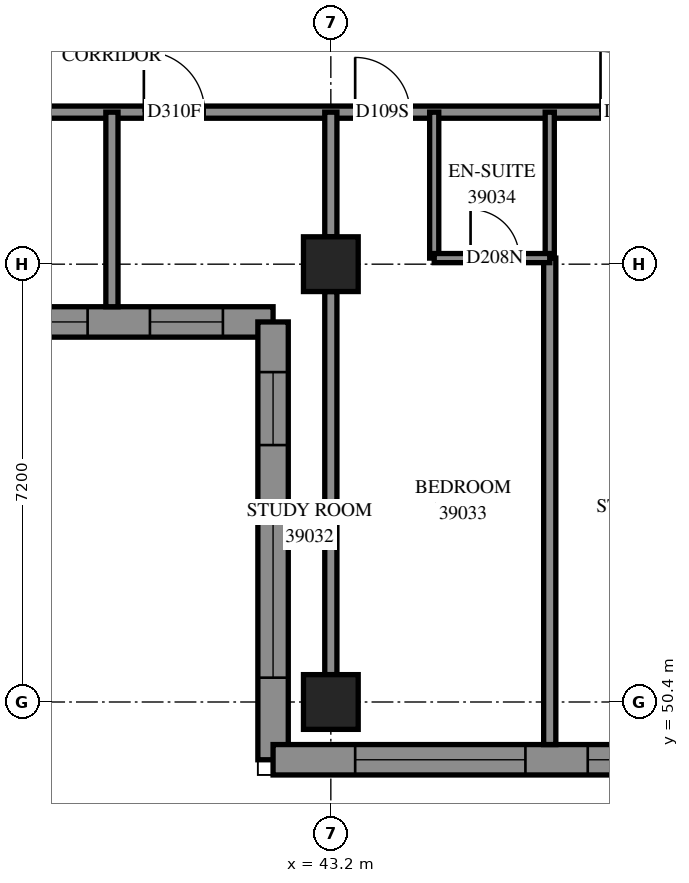
"""IFC4 building model, lengths in metres.
Left out: names, types, materials, properties, quantities, classifications, styles, units other than length and angle.
Written with IfcOpenShell. Run it as: python <this file> out.ifc"""

import sys

from ifc_helpers import new_model, si_unit, direction, frame, frame_2d, origin, origin_2d, place, context, subcontext, project, spatial, polyline, rectangle, outline, extrude, element, fill, save


model = new_model("IFC4")
c1 = context("Model", 3, precision=1e-05, world=origin(), true_north=direction((0.0, 1.0)))
c2 = subcontext(c1, "Body", "Model", "MODEL_VIEW")
j1 = project(units=[si_unit("LENGTHUNIT", "METRE"), si_unit("PLANEANGLEUNIT", "RADIAN")], contexts=[c1])
p1 = place(None, origin())
s1 = spatial("IfcSite", under=j1, at=p1, CompositionType="ELEMENT")
p2 = place(p1, origin())
s2 = spatial("IfcBuilding", under=s1, at=p2, CompositionType="ELEMENT")
p3 = place(p2, frame((0.0, 0.0, 145.6)))
s3 = spatial("IfcBuildingStorey", under=s2, at=p3, CompositionType="ELEMENT", Elevation=145.6)
for number, where, z_axis, x_axis in (
    (1, (43.2, 50.4, 0.0), (0.0, 0.0, 1.0), (1.0, 0.0, 0.0)),
    (2, (43.2, 57.6, 0.0), (0.0, 0.0, 1.0), (1.0, 0.0, 0.0)),
):
    element("IfcColumn", number, at=place(p3, frame(where, z_axis=z_axis, x_axis=x_axis)), inside=s3, PredefinedType="COLUMN", context=c2, shape_type="SweptSolid", body=[
        extrude(rectangle(XDim=0.9, YDim=0.9, at=origin_2d()), origin(), (0.0, 0.0, 1.0), 3.1),
    ])
p4 = place(p3, frame((35.05, 56.65, 0.0), z_axis=(0.0, 0.0, 1.0), x_axis=(1.0, 0.0, 0.0)))
e3 = element("IfcWall", 3, at=p4, inside=s3, PredefinedType="SOLIDWALL", context=c2, shape_type="SweptSolid", body=[
    extrude(outline(polyline([(-0.25, -0.25), (6.95, -0.25), (7.45, 0.25), (0.25, 0.25), (-0.25, -0.25)])), origin(), (0.0, 0.0, 1.0), 3.1),
])
p5 = place(p4, frame((1.35, 0.0, 0.45)))
e4 = element("IfcOpeningElement", 4, at=p5, cuts=e3, PredefinedType="OPENING", context=c2, shape_type="SweptSolid", body=[
    extrude(rectangle(XDim=2.8, YDim=2.5, at=frame_2d((1.4, 1.25))), frame((0.0, 0.26, 0.0), z_axis=(0.0, -1.0, 0.0), x_axis=(1.0, 0.0, 0.0)), (0.0, 0.0, 1.0), 0.52),
])
p6 = place(p4, frame((5.175, 0.0, 0.45)))
e5 = element("IfcOpeningElement", 5, at=p6, cuts=e3, PredefinedType="OPENING", context=c2, shape_type="SweptSolid", body=[
    extrude(rectangle(XDim=1.2, YDim=2.5, at=frame_2d((0.6, 1.25))), frame((0.0, 0.26, 0.0), z_axis=(0.0, -1.0, 0.0), x_axis=(1.0, 0.0, 0.0)), (0.0, 0.0, 1.0), 0.52),
])
p7 = place(p3, frame((42.25, 56.65, 0.0), z_axis=(0.0, 0.0, 1.0), x_axis=(0.0, -1.0, 0.0)))
e6 = element("IfcWall", 6, at=p7, inside=s3, PredefinedType="SOLIDWALL", context=c2, shape_type="SweptSolid", body=[
    extrude(outline(polyline([(0.25, -0.25), (7.45, -0.25), (6.95, 0.25), (-0.25, 0.25), (0.25, -0.25)])), origin(), (0.0, 0.0, 1.0), 3.1),
])
p8 = place(p7, frame((3.05, 0.0, 0.45)))
e7 = element("IfcOpeningElement", 7, at=p8, cuts=e6, PredefinedType="OPENING", context=c2, shape_type="SweptSolid", body=[
    extrude(rectangle(XDim=2.8, YDim=2.5, at=frame_2d((1.4, 1.25))), frame((0.0, 0.26, 0.0), z_axis=(0.0, -1.0, 0.0), x_axis=(1.0, 0.0, 0.0)), (0.0, 0.0, 1.0), 0.52),
])
p9 = place(p7, frame((0.825, 0.0, 0.45)))
e8 = element("IfcOpeningElement", 8, at=p9, cuts=e6, PredefinedType="OPENING", context=c2, shape_type="SweptSolid", body=[
    extrude(rectangle(XDim=1.2, YDim=2.5, at=frame_2d((0.6, 1.25))), frame((0.0, 0.26, 0.0), z_axis=(0.0, -1.0, 0.0), x_axis=(1.0, 0.0, 0.0)), (0.0, 0.0, 1.0), 0.52),
])
p10 = place(p3, frame((42.25, 49.45, 0.0), z_axis=(0.0, 0.0, 1.0), x_axis=(1.0, 0.0, 0.0)))
e9 = element("IfcWall", 9, at=p10, inside=s3, PredefinedType="SOLIDWALL", context=c2, shape_type="SweptSolid", body=[
    extrude(outline(polyline([(-0.25, -0.25), (6.95, -0.25), (7.45, 0.25), (0.25, 0.25), (-0.25, -0.25)])), origin(), (0.0, 0.0, 1.0), 3.1),
])
p11 = place(p10, frame((1.35, 0.0, 0.45)))
e10 = element("IfcOpeningElement", 10, at=p11, cuts=e9, PredefinedType="OPENING", context=c2, shape_type="SweptSolid", body=[
    extrude(rectangle(XDim=2.8, YDim=2.5, at=frame_2d((1.4, 1.25))), frame((0.0, 0.26, 0.0), z_axis=(0.0, -1.0, 0.0), x_axis=(1.0, 0.0, 0.0)), (0.0, 0.0, 1.0), 0.52),
])
p12 = place(p10, frame((5.175, 0.0, 0.45)))
e11 = element("IfcOpeningElement", 11, at=p12, cuts=e9, PredefinedType="OPENING", context=c2, shape_type="SweptSolid", body=[
    extrude(rectangle(XDim=1.2, YDim=2.5, at=frame_2d((0.6, 1.25))), frame((0.0, 0.26, 0.0), z_axis=(0.0, -1.0, 0.0), x_axis=(1.0, 0.0, 0.0)), (0.0, 0.0, 1.0), 0.52),
])
p13 = place(p3, frame((36.0, 60.1, 0.0), z_axis=(0.0, 0.0, 1.0), x_axis=(1.0, 0.0, 0.0)))
e12 = element("IfcWall", 12, at=p13, inside=s3, PredefinedType="PARTITIONING", context=c2, shape_type="SweptSolid", body=[
    extrude(rectangle(XDim=16.9, YDim=0.2, at=frame_2d((8.45, 0.0))), origin(), (0.0, 0.0, 1.0), 3.1),
])
p14 = place(p13, frame((4.125, 0.0, 0.0)))
e13 = element("IfcOpeningElement", 13, at=p14, cuts=e12, PredefinedType="OPENING", context=c2, shape_type="SweptSolid", body=[
    extrude(rectangle(XDim=1.0, YDim=2.1, at=frame_2d((0.5, 1.05))), frame((0.0, 0.11, 0.0), z_axis=(0.0, -1.0, 0.0), x_axis=(1.0, 0.0, 0.0)), (0.0, 0.0, 1.0), 0.22),
])
p15 = place(p13, frame((7.6, 0.0, 0.0)))
e14 = element("IfcOpeningElement", 14, at=p15, cuts=e12, PredefinedType="OPENING", context=c2, shape_type="SweptSolid", body=[
    extrude(rectangle(XDim=0.9, YDim=2.1, at=frame_2d((0.45, 1.05))), frame((0.0, 0.11, 0.0), z_axis=(0.0, -1.0, 0.0), x_axis=(1.0, 0.0, 0.0)), (0.0, 0.0, 1.0), 0.22),
])
p16 = place(p13, frame((11.635, 0.0, 0.0)))
e15 = element("IfcOpeningElement", 15, at=p16, cuts=e12, PredefinedType="OPENING", context=c2, shape_type="SweptSolid", body=[
    extrude(rectangle(XDim=1.0, YDim=2.1, at=frame_2d((0.5, 1.05))), frame((0.0, 0.11, 0.0), z_axis=(0.0, -1.0, 0.0), x_axis=(1.0, 0.0, 0.0)), (0.0, 0.0, 1.0), 0.22),
])
p17 = place(p13, frame((15.652, 0.0, 0.0)))
e16 = element("IfcOpeningElement", 16, at=p17, cuts=e12, PredefinedType="OPENING", context=c2, shape_type="SweptSolid", body=[
    extrude(rectangle(XDim=1.0, YDim=2.1, at=frame_2d((0.5, 1.05))), frame((0.0, 0.11, 0.0), z_axis=(0.0, -1.0, 0.0), x_axis=(1.0, 0.0, 0.0)), (0.0, 0.0, 1.0), 0.22),
])
p18 = place(p3, frame((46.8, 49.7, 0.0), z_axis=(0.0, 0.0, 1.0), x_axis=(0.0, 1.0, 0.0)))
e17 = element("IfcWall", 17, at=p18, inside=s3, PredefinedType="PARTITIONING", context=c2, shape_type="SweptSolid", body=[
    extrude(rectangle(XDim=8.0, YDim=0.2, at=frame_2d((4.0, 0.0))), origin(), (0.0, 0.0, 1.0), 3.1),
])
p19 = place(p3, frame((43.2, 50.85, 0.0), z_axis=(0.0, 0.0, 1.0), x_axis=(0.0, 1.0, 0.0)))
e18 = element("IfcWall", 18, at=p19, inside=s3, PredefinedType="PARTITIONING", context=c2, shape_type="SweptSolid", body=[
    extrude(rectangle(XDim=6.3, YDim=0.2, at=frame_2d((3.15, 0.0))), origin(), (0.0, 0.0, 1.0), 2.6),
])
p20 = place(p3, frame((39.6, 56.9, 0.0), z_axis=(0.0, 0.0, 1.0), x_axis=(0.0, 1.0, 0.0)))
e19 = element("IfcWall", 19, at=p20, inside=s3, PredefinedType="PARTITIONING", context=c2, shape_type="SweptSolid", body=[
    extrude(rectangle(XDim=3.2, YDim=0.2, at=frame_2d((1.6, 0.0))), origin(), (0.0, 0.0, 1.0), 3.1),
])
for number, where, z_axis, x_axis in (
    (20, (44.9, 57.7, 0.0), (0.0, 0.0, 1.0), (0.0, 1.0, 0.0)),
    (21, (46.8, 57.7, 0.0), (0.0, 0.0, 1.0), (0.0, 1.0, 0.0)),
):
    element("IfcWall", number, at=place(p3, frame(where, z_axis=z_axis, x_axis=x_axis)), inside=s3, PredefinedType="PARTITIONING", context=c2, shape_type="SweptSolid", body=[
        extrude(rectangle(XDim=2.4, YDim=0.15, at=frame_2d((1.2, 0.0))), origin(), (0.0, 0.0, 1.0), 3.1),
    ])
p21 = place(p3, frame((43.2, 58.05, 0.0), z_axis=(0.0, 0.0, 1.0), x_axis=(0.0, 1.0, 0.0)))
e22 = element("IfcWall", 22, at=p21, inside=s3, PredefinedType="PARTITIONING", context=c2, shape_type="SweptSolid", body=[
    extrude(rectangle(XDim=2.05, YDim=0.2, at=frame_2d((1.025, 0.0))), origin(), (0.0, 0.0, 1.0), 3.1),
])
p22 = place(p3, frame((44.9, 57.7, 0.0), z_axis=(0.0, 0.0, 1.0), x_axis=(1.0, 0.0, 0.0)))
e23 = element("IfcWall", 23, at=p22, inside=s3, PredefinedType="PARTITIONING", context=c2, shape_type="SweptSolid", body=[
    extrude(rectangle(XDim=1.9, YDim=0.15, at=frame_2d((0.95, 0.0))), origin(), (0.0, 0.0, 1.0), 3.1),
])
p23 = place(p22, frame((0.598, 0.0, 0.0)))
e24 = element("IfcOpeningElement", 24, at=p23, cuts=e23, PredefinedType="OPENING", context=c2, shape_type="SweptSolid", body=[
    extrude(rectangle(XDim=0.8, YDim=2.1, at=frame_2d((0.4, 1.05))), frame((0.0, 0.085, 0.0), z_axis=(0.0, -1.0, 0.0), x_axis=(1.0, 0.0, 0.0)), (0.0, 0.0, 1.0), 0.17),
])
p24 = place(p5, origin())
e25 = element("IfcWindow", 25, at=p24, inside=s3, PartitioningType="SINGLE_PANEL", PredefinedType="WINDOW", context=c2, shape_type="SweptSolid", body=[
    extrude(rectangle(XDim=2.8, YDim=2.5, at=frame_2d((1.4, 1.25))), frame((0.0, 0.18, 0.0), z_axis=(0.0, -1.0, 0.0), x_axis=(1.0, 0.0, 0.0)), (0.0, 0.0, 1.0), 0.06),
])
fill(e4, e25)
p25 = place(p6, origin())
e26 = element("IfcWindow", 26, at=p25, inside=s3, PartitioningType="SINGLE_PANEL", PredefinedType="WINDOW", context=c2, shape_type="SweptSolid", body=[
    extrude(rectangle(XDim=1.2, YDim=2.5, at=frame_2d((0.6, 1.25))), frame((0.0, 0.18, 0.0), z_axis=(0.0, -1.0, 0.0), x_axis=(1.0, 0.0, 0.0)), (0.0, 0.0, 1.0), 0.06),
])
fill(e5, e26)
p26 = place(p8, origin())
e27 = element("IfcWindow", 27, at=p26, inside=s3, PartitioningType="SINGLE_PANEL", PredefinedType="WINDOW", context=c2, shape_type="SweptSolid", body=[
    extrude(rectangle(XDim=2.8, YDim=2.5, at=frame_2d((1.4, 1.25))), frame((0.0, 0.18, 0.0), z_axis=(0.0, -1.0, 0.0), x_axis=(1.0, 0.0, 0.0)), (0.0, 0.0, 1.0), 0.06),
])
fill(e7, e27)
p27 = place(p9, origin())
e28 = element("IfcWindow", 28, at=p27, inside=s3, PartitioningType="SINGLE_PANEL", PredefinedType="WINDOW", context=c2, shape_type="SweptSolid", body=[
    extrude(rectangle(XDim=1.2, YDim=2.5, at=frame_2d((0.6, 1.25))), frame((0.0, 0.18, 0.0), z_axis=(0.0, -1.0, 0.0), x_axis=(1.0, 0.0, 0.0)), (0.0, 0.0, 1.0), 0.06),
])
fill(e8, e28)
p28 = place(p11, origin())
e29 = element("IfcWindow", 29, at=p28, inside=s3, PartitioningType="SINGLE_PANEL", PredefinedType="WINDOW", context=c2, shape_type="SweptSolid", body=[
    extrude(rectangle(XDim=2.8, YDim=2.5, at=frame_2d((1.4, 1.25))), frame((0.0, 0.18, 0.0), z_axis=(0.0, -1.0, 0.0), x_axis=(1.0, 0.0, 0.0)), (0.0, 0.0, 1.0), 0.06),
])
fill(e10, e29)
p29 = place(p12, origin())
e30 = element("IfcWindow", 30, at=p29, inside=s3, PartitioningType="SINGLE_PANEL", PredefinedType="WINDOW", context=c2, shape_type="SweptSolid", body=[
    extrude(rectangle(XDim=1.2, YDim=2.5, at=frame_2d((0.6, 1.25))), frame((0.0, 0.18, 0.0), z_axis=(0.0, -1.0, 0.0), x_axis=(1.0, 0.0, 0.0)), (0.0, 0.0, 1.0), 0.06),
])
fill(e11, e30)
p30 = place(p14, origin())
e31 = element("IfcDoor", 31, at=p30, inside=s3, OperationType="SINGLE_SWING_RIGHT", PredefinedType="DOOR", context=c2, shape_type="SweptSolid", body=[
    extrude(rectangle(XDim=1.0, YDim=2.1, at=frame_2d((0.5, 1.05))), frame((0.0, 0.025, 0.0), z_axis=(0.0, -1.0, 0.0), x_axis=(1.0, 0.0, 0.0)), (0.0, 0.0, 1.0), 0.05),
])
fill(e13, e31)
p31 = place(p15, origin())
e32 = element("IfcDoor", 32, at=p31, inside=s3, OperationType="SINGLE_SWING_LEFT", PredefinedType="DOOR", context=c2, shape_type="SweptSolid", body=[
    extrude(rectangle(XDim=0.9, YDim=2.1, at=frame_2d((0.45, 1.05))), frame((0.0, 0.025, 0.0), z_axis=(0.0, -1.0, 0.0), x_axis=(1.0, 0.0, 0.0)), (0.0, 0.0, 1.0), 0.05),
])
fill(e14, e32)
p32 = place(p23, origin())
e33 = element("IfcDoor", 33, at=p32, inside=s3, OperationType="SINGLE_SWING_RIGHT", PredefinedType="DOOR", context=c2, shape_type="SweptSolid", body=[
    extrude(rectangle(XDim=0.8, YDim=2.1, at=frame_2d((0.4, 1.05))), frame((0.0, 0.025, 0.0), z_axis=(0.0, -1.0, 0.0), x_axis=(1.0, 0.0, 0.0)), (0.0, 0.0, 1.0), 0.05),
])
fill(e24, e33)
p33 = place(p16, origin())
e34 = element("IfcDoor", 34, at=p33, inside=s3, OperationType="SINGLE_SWING_RIGHT", PredefinedType="DOOR", context=c2, shape_type="SweptSolid", body=[
    extrude(rectangle(XDim=1.0, YDim=2.1, at=frame_2d((0.5, 1.05))), frame((0.0, 0.025, 0.0), z_axis=(0.0, -1.0, 0.0), x_axis=(1.0, 0.0, 0.0)), (0.0, 0.0, 1.0), 0.05),
])
fill(e15, e34)
save(model, sys.argv[1])
